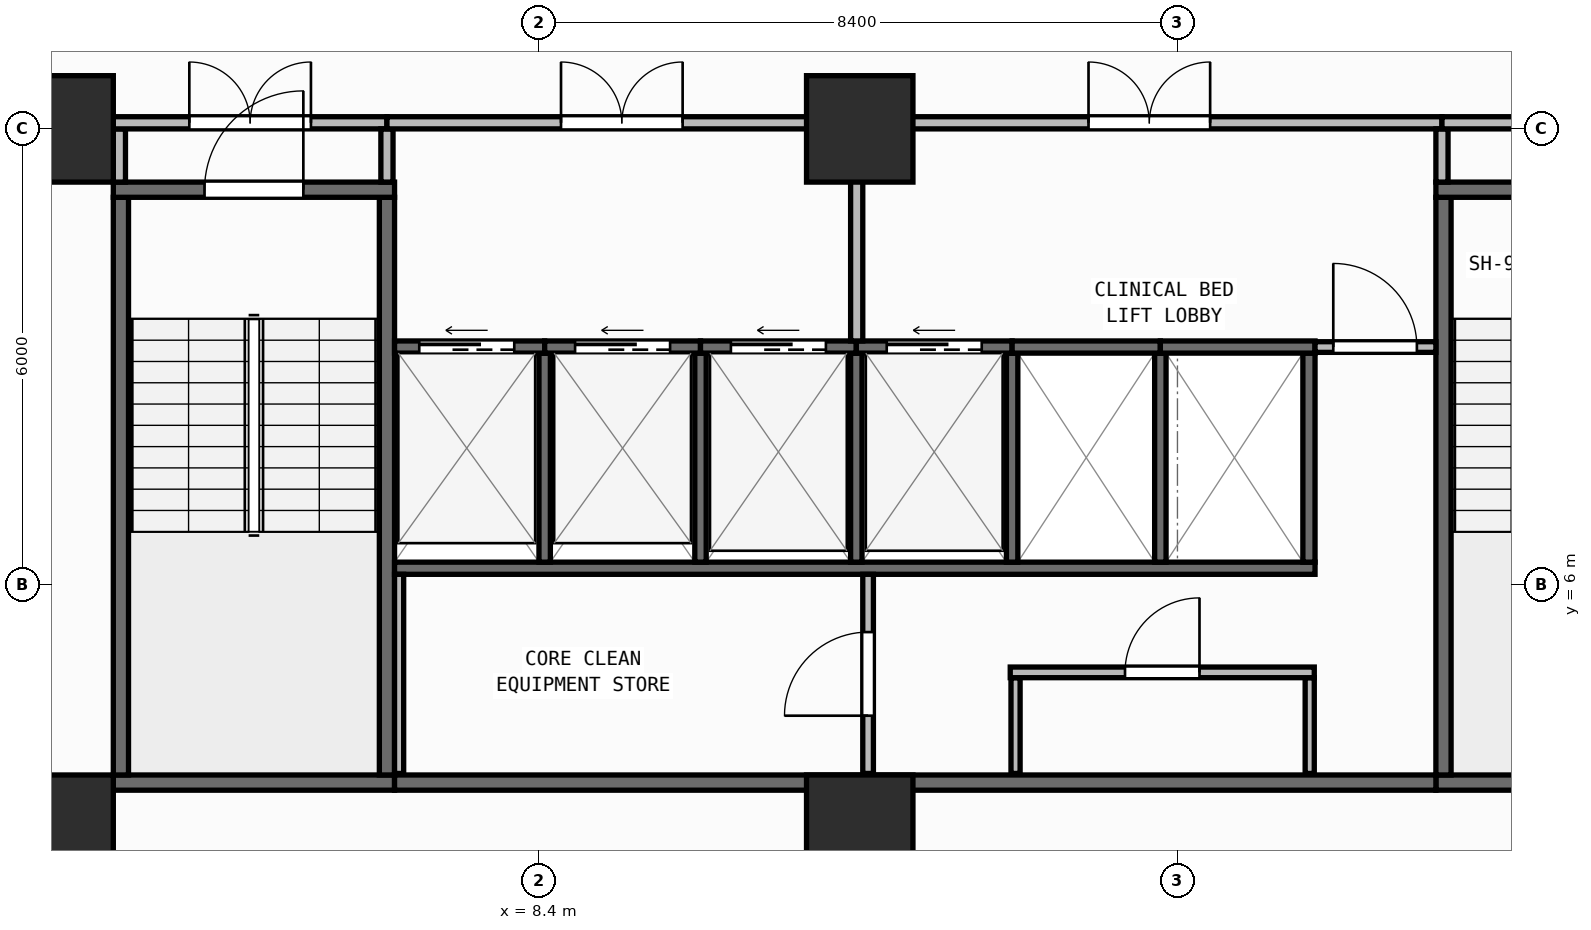
"""IFC4 building model, lengths in metres.
Left out: names, types, materials, properties, quantities, classifications, styles, units other than length and angle.
Written with IfcOpenShell. Run it as: python <this file> out.ifc"""

import sys

from ifc_helpers import new_model, si_unit, direction, frame, frame_2d, origin, origin_2d, place, context, subcontext, project, spatial, rectangle, extrude, element, fill, save


model = new_model("IFC4")
c1 = context("Model", 3, precision=1e-05, world=origin(), true_north=direction((0.0, 1.0)))
c2 = subcontext(c1, "Body", "Model", "MODEL_VIEW")
j1 = project(units=[si_unit("LENGTHUNIT", "METRE"), si_unit("PLANEANGLEUNIT", "RADIAN")], contexts=[c1])
p1 = place(None, origin())
s1 = spatial("IfcSite", under=j1, at=p1, CompositionType="ELEMENT")
p2 = place(p1, origin())
s2 = spatial("IfcBuilding", under=s1, at=p2, CompositionType="ELEMENT")
p3 = place(p2, frame((0.0, 0.0, 38.3)))
s3 = spatial("IfcBuildingStorey", under=s2, at=p3, CompositionType="ELEMENT", Elevation=38.3)
for number, where, z_axis, x_axis in (
    (1, (2.1, 2.8, 0.0), (0.0, 0.0, 1.0), (1.0, 0.0, 0.0)),
    (2, (12.62, 2.8, 0.0), (0.0, 0.0, 1.0), (1.0, 0.0, 0.0)),
    (3, (2.1, 12.0, 0.0), (0.0, 0.0, 1.0), (1.0, 0.0, 0.0)),
    (4, (12.62, 12.0, 0.0), (0.0, 0.0, 1.0), (1.0, 0.0, 0.0)),
):
    element("IfcColumn", number, at=place(p3, frame(where, z_axis=z_axis, x_axis=x_axis)), inside=s3, PredefinedType="COLUMN", context=c2, shape_type="SweptSolid", body=[
        extrude(rectangle(XDim=1.4, YDim=1.4, at=origin_2d()), origin(), (0.0, 0.0, 1.0), 3.95),
    ])
p4 = place(p3, frame((2.76, 0.174, 0.0), z_axis=(0.0, 0.0, 1.0), x_axis=(0.996571478456, 0.082736257641, 0.0)))
e5 = element("IfcWall", 5, at=p4, inside=s3, PredefinedType="STANDARD", context=c2, shape_type="SweptSolid", body=[
    extrude(rectangle(XDim=52.861, YDim=0.26, at=frame_2d((26.431, 0.0))), origin(), (0.0, 0.0, 1.0), 3.71),
])
p5 = place(p4, frame((25.231, 0.0, 0.9)))
e6 = element("IfcOpeningElement", 6, at=p5, cuts=e5, PredefinedType="OPENING", context=c2, shape_type="SweptSolid", body=[
    extrude(rectangle(XDim=2.4, YDim=1.65, at=frame_2d((1.2, 0.825))), frame((0.0, 0.14, 0.0), z_axis=(0.0, -1.0, 0.0), x_axis=(1.0, 0.0, 0.0)), (0.0, 0.0, 1.0), 0.28),
])
p6 = place(p3, frame((2.8, 3.4, 0.0), z_axis=(0.0, 0.0, 1.0), x_axis=(1.0, 0.0, 0.0)))
e7 = element("IfcWall", 7, at=p6, inside=s3, PredefinedType="SHEAR", context=c2, shape_type="SweptSolid", body=[
    extrude(rectangle(XDim=3.7, YDim=0.2, at=frame_2d((1.85, 0.0))), origin(), (0.0, 0.0, 1.0), 3.71),
])
for number, where, z_axis, x_axis in (
    (8, (2.9, 3.5, 0.0), (0.0, 0.0, 1.0), (0.0, 1.0, 0.0)),
    (9, (6.4, 3.5, 0.0), (0.0, 0.0, 1.0), (0.0, 1.0, 0.0)),
):
    element("IfcWall", number, at=place(p3, frame(where, z_axis=z_axis, x_axis=x_axis)), inside=s3, PredefinedType="SHEAR", context=c2, shape_type="SweptSolid", body=[
        extrude(rectangle(XDim=7.6, YDim=0.2, at=frame_2d((3.8, 0.0))), origin(), (0.0, 0.0, 1.0), 3.71),
    ])
p7 = place(p3, frame((2.8, 11.2, 0.0), z_axis=(0.0, 0.0, 1.0), x_axis=(1.0, 0.0, 0.0)))
e10 = element("IfcWall", 10, at=p7, inside=s3, PredefinedType="SHEAR", context=c2, shape_type="SweptSolid", body=[
    extrude(rectangle(XDim=3.7, YDim=0.2, at=frame_2d((1.85, 0.0))), origin(), (0.0, 0.0, 1.0), 3.71),
])
p8 = place(p7, frame((1.2, 0.0, 0.0)))
e11 = element("IfcOpeningElement", 11, at=p8, cuts=e10, PredefinedType="OPENING", context=c2, shape_type="SweptSolid", body=[
    extrude(rectangle(XDim=1.3, YDim=2.15, at=frame_2d((0.65, 1.075))), frame((0.0, 0.11, 0.0), z_axis=(0.0, -1.0, 0.0), x_axis=(1.0, 0.0, 0.0)), (0.0, 0.0, 1.0), 0.22),
])
p9 = place(p3, frame((20.2, 3.4, 0.0), z_axis=(0.0, 0.0, 1.0), x_axis=(1.0, 0.0, 0.0)))
e12 = element("IfcWall", 12, at=p9, inside=s3, PredefinedType="SHEAR", context=c2, shape_type="SweptSolid", body=[
    extrude(rectangle(XDim=3.7, YDim=0.2, at=frame_2d((1.85, 0.0))), origin(), (0.0, 0.0, 1.0), 3.71),
])
p10 = place(p3, frame((20.3, 3.5, 0.0), z_axis=(0.0, 0.0, 1.0), x_axis=(0.0, 1.0, 0.0)))
e13 = element("IfcWall", 13, at=p10, inside=s3, PredefinedType="SHEAR", context=c2, shape_type="SweptSolid", body=[
    extrude(rectangle(XDim=7.6, YDim=0.2, at=frame_2d((3.8, 0.0))), origin(), (0.0, 0.0, 1.0), 3.71),
])
p11 = place(p3, frame((20.2, 11.2, 0.0), z_axis=(0.0, 0.0, 1.0), x_axis=(1.0, 0.0, 0.0)))
e14 = element("IfcWall", 14, at=p11, inside=s3, PredefinedType="SHEAR", context=c2, shape_type="SweptSolid", body=[
    extrude(rectangle(XDim=3.7, YDim=0.2, at=frame_2d((1.85, 0.0))), origin(), (0.0, 0.0, 1.0), 3.71),
])
p12 = place(p11, frame((1.2, 0.0, 0.0)))
e15 = element("IfcOpeningElement", 15, at=p12, cuts=e14, PredefinedType="OPENING", context=c2, shape_type="SweptSolid", body=[
    extrude(rectangle(XDim=1.3, YDim=2.15, at=frame_2d((0.65, 1.075))), frame((0.0, 0.11, 0.0), z_axis=(0.0, -1.0, 0.0), x_axis=(1.0, 0.0, 0.0)), (0.0, 0.0, 1.0), 0.22),
])
p13 = place(p3, frame((6.5, 3.4, 0.0), z_axis=(0.0, 0.0, 1.0), x_axis=(1.0, 0.0, 0.0)))
e16 = element("IfcWall", 16, at=p13, inside=s3, PredefinedType="SHEAR", context=c2, shape_type="SweptSolid", body=[
    extrude(rectangle(XDim=13.7, YDim=0.2, at=frame_2d((6.85, 0.0))), origin(), (0.0, 0.0, 1.0), 3.71),
])
p14 = place(p3, frame((6.5, 6.22, 0.0), z_axis=(0.0, 0.0, 1.0), x_axis=(1.0, 0.0, 0.0)))
e17 = element("IfcWall", 17, at=p14, inside=s3, PredefinedType="SHEAR", context=c2, shape_type="SweptSolid", body=[
    extrude(rectangle(XDim=12.11, YDim=0.16, at=frame_2d((6.055, 0.0))), origin(), (0.0, 0.0, 1.0), 3.71),
])
p15 = place(p3, frame((18.53, 6.3, 0.0), z_axis=(0.0, 0.0, 1.0), x_axis=(0.0, 1.0, 0.0)))
e18 = element("IfcWall", 18, at=p15, inside=s3, PredefinedType="SHEAR", context=c2, shape_type="SweptSolid", body=[
    extrude(rectangle(XDim=2.75, YDim=0.16, at=frame_2d((1.375, 0.0))), origin(), (0.0, 0.0, 1.0), 3.71),
])
for number, where, z_axis, x_axis in (
    (19, (8.475, 6.3, 0.0), (0.0, 0.0, 1.0), (0.0, 1.0, 0.0)),
    (20, (10.525, 6.3, 0.0), (0.0, 0.0, 1.0), (0.0, 1.0, 0.0)),
    (21, (12.575, 6.3, 0.0), (0.0, 0.0, 1.0), (0.0, 1.0, 0.0)),
    (22, (14.625, 6.3, 0.0), (0.0, 0.0, 1.0), (0.0, 1.0, 0.0)),
    (23, (16.575, 6.3, 0.0), (0.0, 0.0, 1.0), (0.0, 1.0, 0.0)),
):
    element("IfcWall", number, at=place(p3, frame(where, z_axis=z_axis, x_axis=x_axis)), inside=s3, PredefinedType="SHEAR", context=c2, shape_type="SweptSolid", body=[
        extrude(rectangle(XDim=2.75, YDim=0.15, at=frame_2d((1.375, 0.0))), origin(), (0.0, 0.0, 1.0), 3.71),
    ])
p16 = place(p3, frame((6.5, 9.13, 0.0), z_axis=(0.0, 0.0, 1.0), x_axis=(1.0, 0.0, 0.0)))
e24 = element("IfcWall", 24, at=p16, inside=s3, PredefinedType="SHEAR", context=c2, shape_type="SweptSolid", body=[
    extrude(rectangle(XDim=1.975, YDim=0.16, at=frame_2d((0.988, 0.0))), origin(), (0.0, 0.0, 1.0), 3.71),
])
p17 = place(p16, frame((0.325, 0.0, 0.0)))
e25 = element("IfcOpeningElement", 25, at=p17, cuts=e24, PredefinedType="OPENING", context=c2, shape_type="SweptSolid", body=[
    extrude(rectangle(XDim=1.25, YDim=2.15, at=frame_2d((0.625, 1.075))), frame((0.0, 0.09, 0.0), z_axis=(0.0, -1.0, 0.0), x_axis=(1.0, 0.0, 0.0)), (0.0, 0.0, 1.0), 0.18),
])
p18 = place(p3, frame((8.475, 9.13, 0.0), z_axis=(0.0, 0.0, 1.0), x_axis=(1.0, 0.0, 0.0)))
e26 = element("IfcWall", 26, at=p18, inside=s3, PredefinedType="SHEAR", context=c2, shape_type="SweptSolid", body=[
    extrude(rectangle(XDim=2.05, YDim=0.16, at=frame_2d((1.025, 0.0))), origin(), (0.0, 0.0, 1.0), 3.71),
])
p19 = place(p18, frame((0.4, 0.0, 0.0)))
e27 = element("IfcOpeningElement", 27, at=p19, cuts=e26, PredefinedType="OPENING", context=c2, shape_type="SweptSolid", body=[
    extrude(rectangle(XDim=1.25, YDim=2.15, at=frame_2d((0.625, 1.075))), frame((0.0, 0.09, 0.0), z_axis=(0.0, -1.0, 0.0), x_axis=(1.0, 0.0, 0.0)), (0.0, 0.0, 1.0), 0.18),
])
p20 = place(p3, frame((10.525, 9.13, 0.0), z_axis=(0.0, 0.0, 1.0), x_axis=(1.0, 0.0, 0.0)))
e28 = element("IfcWall", 28, at=p20, inside=s3, PredefinedType="SHEAR", context=c2, shape_type="SweptSolid", body=[
    extrude(rectangle(XDim=2.05, YDim=0.16, at=frame_2d((1.025, 0.0))), origin(), (0.0, 0.0, 1.0), 3.71),
])
p21 = place(p20, frame((0.4, 0.0, 0.0)))
e29 = element("IfcOpeningElement", 29, at=p21, cuts=e28, PredefinedType="OPENING", context=c2, shape_type="SweptSolid", body=[
    extrude(rectangle(XDim=1.25, YDim=2.15, at=frame_2d((0.625, 1.075))), frame((0.0, 0.09, 0.0), z_axis=(0.0, -1.0, 0.0), x_axis=(1.0, 0.0, 0.0)), (0.0, 0.0, 1.0), 0.18),
])
p22 = place(p3, frame((12.575, 9.13, 0.0), z_axis=(0.0, 0.0, 1.0), x_axis=(1.0, 0.0, 0.0)))
e30 = element("IfcWall", 30, at=p22, inside=s3, PredefinedType="SHEAR", context=c2, shape_type="SweptSolid", body=[
    extrude(rectangle(XDim=2.05, YDim=0.16, at=frame_2d((1.025, 0.0))), origin(), (0.0, 0.0, 1.0), 3.71),
])
p23 = place(p22, frame((0.4, 0.0, 0.0)))
e31 = element("IfcOpeningElement", 31, at=p23, cuts=e30, PredefinedType="OPENING", context=c2, shape_type="SweptSolid", body=[
    extrude(rectangle(XDim=1.25, YDim=2.15, at=frame_2d((0.625, 1.075))), frame((0.0, 0.09, 0.0), z_axis=(0.0, -1.0, 0.0), x_axis=(1.0, 0.0, 0.0)), (0.0, 0.0, 1.0), 0.18),
])
p24 = place(p3, frame((14.625, 9.13, 0.0), z_axis=(0.0, 0.0, 1.0), x_axis=(1.0, 0.0, 0.0)))
e32 = element("IfcWall", 32, at=p24, inside=s3, PredefinedType="SHEAR", context=c2, shape_type="SweptSolid", body=[
    extrude(rectangle(XDim=1.95, YDim=0.16, at=frame_2d((0.975, 0.0))), origin(), (0.0, 0.0, 1.0), 3.71),
])
p25 = place(p3, frame((16.575, 9.13, 0.0), z_axis=(0.0, 0.0, 1.0), x_axis=(1.0, 0.0, 0.0)))
e33 = element("IfcWall", 33, at=p25, inside=s3, PredefinedType="SHEAR", context=c2, shape_type="SweptSolid", body=[
    extrude(rectangle(XDim=2.035, YDim=0.16, at=frame_2d((1.018, 0.0))), origin(), (0.0, 0.0, 1.0), 3.71),
])
p26 = place(p3, frame((6.56, 3.52, 0.0), z_axis=(0.0, 0.0, 1.0), x_axis=(0.0, 1.0, 0.0)))
e34 = element("IfcWall", 34, at=p26, inside=s3, PredefinedType="PARTITIONING", context=c2, shape_type="SweptSolid", body=[
    extrude(rectangle(XDim=2.62, YDim=0.12, at=frame_2d((1.31, 0.0))), origin(), (0.0, 0.0, 1.0), 3.71),
])
p27 = place(p3, frame((12.73, 3.52, 0.0), z_axis=(0.0, 0.0, 1.0), x_axis=(0.0, 1.0, 0.0)))
e35 = element("IfcWall", 35, at=p27, inside=s3, PredefinedType="PARTITIONING", context=c2, shape_type="SweptSolid", body=[
    extrude(rectangle(XDim=2.62, YDim=0.14, at=frame_2d((1.31, 0.0))), origin(), (0.0, 0.0, 1.0), 3.71),
])
p28 = place(p27, frame((0.76, 0.0, 0.0)))
e36 = element("IfcOpeningElement", 36, at=p28, cuts=e35, PredefinedType="OPENING", context=c2, shape_type="SweptSolid", body=[
    extrude(rectangle(XDim=1.1, YDim=2.1, at=frame_2d((0.55, 1.05))), frame((0.0, 0.08, 0.0), z_axis=(0.0, -1.0, 0.0), x_axis=(1.0, 0.0, 0.0)), (0.0, 0.0, 1.0), 0.16),
])
for number, where, z_axis, x_axis in (
    (37, (14.67, 3.52, 0.0), (0.0, 0.0, 1.0), (0.0, 1.0, 0.0)),
    (38, (18.54, 3.52, 0.0), (0.0, 0.0, 1.0), (0.0, 1.0, 0.0)),
):
    element("IfcWall", number, at=place(p3, frame(where, z_axis=z_axis, x_axis=x_axis)), inside=s3, PredefinedType="PARTITIONING", context=c2, shape_type="SweptSolid", body=[
        extrude(rectangle(XDim=1.26, YDim=0.12, at=frame_2d((0.63, 0.0))), origin(), (0.0, 0.0, 1.0), 3.71),
    ])
p29 = place(p3, frame((14.6, 4.85, 0.0), z_axis=(0.0, 0.0, 1.0), x_axis=(1.0, 0.0, 0.0)))
e39 = element("IfcWall", 39, at=p29, inside=s3, PredefinedType="PARTITIONING", context=c2, shape_type="SweptSolid", body=[
    extrude(rectangle(XDim=4.0, YDim=0.14, at=frame_2d((2.0, 0.0))), origin(), (0.0, 0.0, 1.0), 3.71),
])
p30 = place(p29, frame((1.51, 0.0, 0.0)))
e40 = element("IfcOpeningElement", 40, at=p30, cuts=e39, PredefinedType="OPENING", context=c2, shape_type="SweptSolid", body=[
    extrude(rectangle(XDim=0.98, YDim=2.1, at=frame_2d((0.49, 1.05))), frame((0.0, 0.08, 0.0), z_axis=(0.0, -1.0, 0.0), x_axis=(1.0, 0.0, 0.0)), (0.0, 0.0, 1.0), 0.16),
])
p31 = place(p3, frame((18.61, 9.13, 0.0), z_axis=(0.0, 0.0, 1.0), x_axis=(1.0, 0.0, 0.0)))
e41 = element("IfcWall", 41, at=p31, inside=s3, PredefinedType="PARTITIONING", context=c2, shape_type="SweptSolid", body=[
    extrude(rectangle(XDim=1.59, YDim=0.14, at=frame_2d((0.795, 0.0))), origin(), (0.0, 0.0, 1.0), 3.71),
])
p32 = place(p31, frame((0.24, 0.0, 0.0)))
e42 = element("IfcOpeningElement", 42, at=p32, cuts=e41, PredefinedType="OPENING", context=c2, shape_type="SweptSolid", body=[
    extrude(rectangle(XDim=1.1, YDim=2.1, at=frame_2d((0.55, 1.05))), frame((0.0, 0.08, 0.0), z_axis=(0.0, -1.0, 0.0), x_axis=(1.0, 0.0, 0.0)), (0.0, 0.0, 1.0), 0.16),
])
p33 = place(p3, frame((2.88, 11.3, 0.0), z_axis=(0.0, 0.0, 1.0), x_axis=(0.0, 1.0, 0.0)))
e43 = element("IfcWall", 43, at=p33, inside=s3, PredefinedType="PARTITIONING", context=c2, shape_type="SweptSolid", body=[
    extrude(rectangle(XDim=0.7, YDim=0.16, at=frame_2d((0.35, 0.0))), origin(), (0.0, 0.0, 1.0), 3.71),
])
p34 = place(p3, frame((2.8, 12.08, 0.0), z_axis=(0.0, 0.0, 1.0), x_axis=(1.0, 0.0, 0.0)))
e44 = element("IfcWall", 44, at=p34, inside=s3, PredefinedType="PARTITIONING", context=c2, shape_type="SweptSolid", body=[
    extrude(rectangle(XDim=3.6, YDim=0.16, at=frame_2d((1.8, 0.0))), origin(), (0.0, 0.0, 1.0), 3.073),
])
p35 = place(p34, frame((1.0, 0.0, 0.0)))
e45 = element("IfcOpeningElement", 45, at=p35, cuts=e44, PredefinedType="OPENING", context=c2, shape_type="SweptSolid", body=[
    extrude(rectangle(XDim=1.6, YDim=2.05, at=frame_2d((0.8, 1.025))), frame((0.0, 0.09, 0.0), z_axis=(0.0, -1.0, 0.0), x_axis=(1.0, 0.0, 0.0)), (0.0, 0.0, 1.0), 0.18),
])
p36 = place(p3, frame((6.4, 11.3, 0.0), z_axis=(0.0, 0.0, 1.0), x_axis=(0.0, 1.0, 0.0)))
e46 = element("IfcWall", 46, at=p36, inside=s3, PredefinedType="PARTITIONING", context=c2, shape_type="SweptSolid", body=[
    extrude(rectangle(XDim=0.7, YDim=0.16, at=frame_2d((0.35, 0.0))), origin(), (0.0, 0.0, 1.0), 3.71),
])
p37 = place(p3, frame((6.4, 12.08, 0.0), z_axis=(0.0, 0.0, 1.0), x_axis=(1.0, 0.0, 0.0)))
e47 = element("IfcWall", 47, at=p37, inside=s3, PredefinedType="PARTITIONING", context=c2, shape_type="SweptSolid", body=[
    extrude(rectangle(XDim=6.18, YDim=0.16, at=frame_2d((3.09, 0.0))), origin(), (0.0, 0.0, 1.0), 3.073),
])
p38 = place(p37, frame((2.29, 0.0, 0.0)))
e48 = element("IfcOpeningElement", 48, at=p38, cuts=e47, PredefinedType="OPENING", context=c2, shape_type="SweptSolid", body=[
    extrude(rectangle(XDim=1.6, YDim=2.05, at=frame_2d((0.8, 1.025))), frame((0.0, 0.09, 0.0), z_axis=(0.0, -1.0, 0.0), x_axis=(1.0, 0.0, 0.0)), (0.0, 0.0, 1.0), 0.18),
])
p39 = place(p3, frame((12.58, 9.21, 0.0), z_axis=(0.0, 0.0, 1.0), x_axis=(0.0, 1.0, 0.0)))
e49 = element("IfcWall", 49, at=p39, inside=s3, PredefinedType="PARTITIONING", context=c2, shape_type="SweptSolid", body=[
    extrude(rectangle(XDim=2.79, YDim=0.16, at=frame_2d((1.395, 0.0))), origin(), (0.0, 0.0, 1.0), 3.71),
])
p40 = place(p3, frame((12.58, 12.08, 0.0), z_axis=(0.0, 0.0, 1.0), x_axis=(1.0, 0.0, 0.0)))
e50 = element("IfcWall", 50, at=p40, inside=s3, PredefinedType="PARTITIONING", context=c2, shape_type="SweptSolid", body=[
    extrude(rectangle(XDim=7.7, YDim=0.16, at=frame_2d((3.85, 0.0))), origin(), (0.0, 0.0, 1.0), 3.073),
])
p41 = place(p40, frame((3.05, 0.0, 0.0)))
e51 = element("IfcOpeningElement", 51, at=p41, cuts=e50, PredefinedType="OPENING", context=c2, shape_type="SweptSolid", body=[
    extrude(rectangle(XDim=1.6, YDim=2.05, at=frame_2d((0.8, 1.025))), frame((0.0, 0.09, 0.0), z_axis=(0.0, -1.0, 0.0), x_axis=(1.0, 0.0, 0.0)), (0.0, 0.0, 1.0), 0.18),
])
p42 = place(p3, frame((20.28, 11.3, 0.0), z_axis=(0.0, 0.0, 1.0), x_axis=(0.0, 1.0, 0.0)))
e52 = element("IfcWall", 52, at=p42, inside=s3, PredefinedType="PARTITIONING", context=c2, shape_type="SweptSolid", body=[
    extrude(rectangle(XDim=0.7, YDim=0.16, at=frame_2d((0.35, 0.0))), origin(), (0.0, 0.0, 1.0), 3.71),
])
p43 = place(p3, frame((20.28, 12.08, 0.0), z_axis=(0.0, 0.0, 1.0), x_axis=(1.0, 0.0, 0.0)))
e53 = element("IfcWall", 53, at=p43, inside=s3, PredefinedType="PARTITIONING", context=c2, shape_type="SweptSolid", body=[
    extrude(rectangle(XDim=3.62, YDim=0.16, at=frame_2d((1.81, 0.0))), origin(), (0.0, 0.0, 1.0), 3.073),
])
p44 = place(p43, frame((1.01, 0.0, 0.0)))
e54 = element("IfcOpeningElement", 54, at=p44, cuts=e53, PredefinedType="OPENING", context=c2, shape_type="SweptSolid", body=[
    extrude(rectangle(XDim=1.6, YDim=2.05, at=frame_2d((0.8, 1.025))), frame((0.0, 0.09, 0.0), z_axis=(0.0, -1.0, 0.0), x_axis=(1.0, 0.0, 0.0)), (0.0, 0.0, 1.0), 0.18),
])
p45 = place(p8, origin())
e55 = element("IfcDoor", 55, at=p45, inside=s3, OperationType="SINGLE_SWING_RIGHT", PredefinedType="DOOR", context=c2, shape_type="SweptSolid", body=[
    extrude(rectangle(XDim=1.3, YDim=2.15, at=frame_2d((0.65, 1.075))), frame((0.0, 0.025, 0.0), z_axis=(0.0, -1.0, 0.0), x_axis=(1.0, 0.0, 0.0)), (0.0, 0.0, 1.0), 0.05),
])
fill(e11, e55)
p46 = place(p17, origin())
e56 = element("IfcDoor", 56, at=p46, inside=s3, OperationType="SLIDING_TO_LEFT", PredefinedType="DOOR", context=c2, shape_type="SweptSolid", body=[
    extrude(rectangle(XDim=1.25, YDim=2.15, at=frame_2d((0.625, 1.075))), frame((0.0, 0.025, 0.0), z_axis=(0.0, -1.0, 0.0), x_axis=(1.0, 0.0, 0.0)), (0.0, 0.0, 1.0), 0.05),
])
fill(e25, e56)
p47 = place(p19, origin())
e57 = element("IfcDoor", 57, at=p47, inside=s3, OperationType="SLIDING_TO_LEFT", PredefinedType="DOOR", context=c2, shape_type="SweptSolid", body=[
    extrude(rectangle(XDim=1.25, YDim=2.15, at=frame_2d((0.625, 1.075))), frame((0.0, 0.025, 0.0), z_axis=(0.0, -1.0, 0.0), x_axis=(1.0, 0.0, 0.0)), (0.0, 0.0, 1.0), 0.05),
])
fill(e27, e57)
p48 = place(p21, origin())
e58 = element("IfcDoor", 58, at=p48, inside=s3, OperationType="SLIDING_TO_LEFT", PredefinedType="DOOR", context=c2, shape_type="SweptSolid", body=[
    extrude(rectangle(XDim=1.25, YDim=2.15, at=frame_2d((0.625, 1.075))), frame((0.0, 0.025, 0.0), z_axis=(0.0, -1.0, 0.0), x_axis=(1.0, 0.0, 0.0)), (0.0, 0.0, 1.0), 0.05),
])
fill(e29, e58)
p49 = place(p23, origin())
e59 = element("IfcDoor", 59, at=p49, inside=s3, OperationType="SLIDING_TO_LEFT", PredefinedType="DOOR", context=c2, shape_type="SweptSolid", body=[
    extrude(rectangle(XDim=1.25, YDim=2.15, at=frame_2d((0.625, 1.075))), frame((0.0, 0.025, 0.0), z_axis=(0.0, -1.0, 0.0), x_axis=(1.0, 0.0, 0.0)), (0.0, 0.0, 1.0), 0.05),
])
fill(e31, e59)
p50 = place(p28, origin())
e60 = element("IfcDoor", 60, at=p50, inside=s3, OperationType="SINGLE_SWING_LEFT", PredefinedType="DOOR", context=c2, shape_type="SweptSolid", body=[
    extrude(rectangle(XDim=1.1, YDim=2.1, at=frame_2d((0.55, 1.05))), frame((0.0, 0.025, 0.0), z_axis=(0.0, -1.0, 0.0), x_axis=(1.0, 0.0, 0.0)), (0.0, 0.0, 1.0), 0.05),
])
fill(e36, e60)
p51 = place(p30, origin())
e61 = element("IfcDoor", 61, at=p51, inside=s3, OperationType="SINGLE_SWING_RIGHT", PredefinedType="DOOR", context=c2, shape_type="SweptSolid", body=[
    extrude(rectangle(XDim=0.98, YDim=2.1, at=frame_2d((0.49, 1.05))), frame((0.0, 0.025, 0.0), z_axis=(0.0, -1.0, 0.0), x_axis=(1.0, 0.0, 0.0)), (0.0, 0.0, 1.0), 0.05),
])
fill(e40, e61)
p52 = place(p32, origin())
e62 = element("IfcDoor", 62, at=p52, inside=s3, OperationType="SINGLE_SWING_LEFT", PredefinedType="DOOR", context=c2, shape_type="SweptSolid", body=[
    extrude(rectangle(XDim=1.1, YDim=2.1, at=frame_2d((0.55, 1.05))), frame((0.0, 0.025, 0.0), z_axis=(0.0, -1.0, 0.0), x_axis=(1.0, 0.0, 0.0)), (0.0, 0.0, 1.0), 0.05),
])
fill(e42, e62)
p53 = place(p35, origin())
e63 = element("IfcDoor", 63, at=p53, inside=s3, OperationType="DOUBLE_DOOR_SINGLE_SWING", PredefinedType="DOOR", context=c2, shape_type="SweptSolid", body=[
    extrude(rectangle(XDim=1.6, YDim=2.05, at=frame_2d((0.8, 1.025))), frame((0.0, 0.025, 0.0), z_axis=(0.0, -1.0, 0.0), x_axis=(1.0, 0.0, 0.0)), (0.0, 0.0, 1.0), 0.05),
])
fill(e45, e63)
p54 = place(p38, origin())
e64 = element("IfcDoor", 64, at=p54, inside=s3, OperationType="DOUBLE_DOOR_SINGLE_SWING", PredefinedType="DOOR", context=c2, shape_type="SweptSolid", body=[
    extrude(rectangle(XDim=1.6, YDim=2.05, at=frame_2d((0.8, 1.025))), frame((0.0, 0.025, 0.0), z_axis=(0.0, -1.0, 0.0), x_axis=(1.0, 0.0, 0.0)), (0.0, 0.0, 1.0), 0.05),
])
fill(e48, e64)
p55 = place(p41, origin())
e65 = element("IfcDoor", 65, at=p55, inside=s3, OperationType="DOUBLE_DOOR_SINGLE_SWING", PredefinedType="DOOR", context=c2, shape_type="SweptSolid", body=[
    extrude(rectangle(XDim=1.6, YDim=2.05, at=frame_2d((0.8, 1.025))), frame((0.0, 0.025, 0.0), z_axis=(0.0, -1.0, 0.0), x_axis=(1.0, 0.0, 0.0)), (0.0, 0.0, 1.0), 0.05),
])
fill(e51, e65)
save(model, sys.argv[1])
